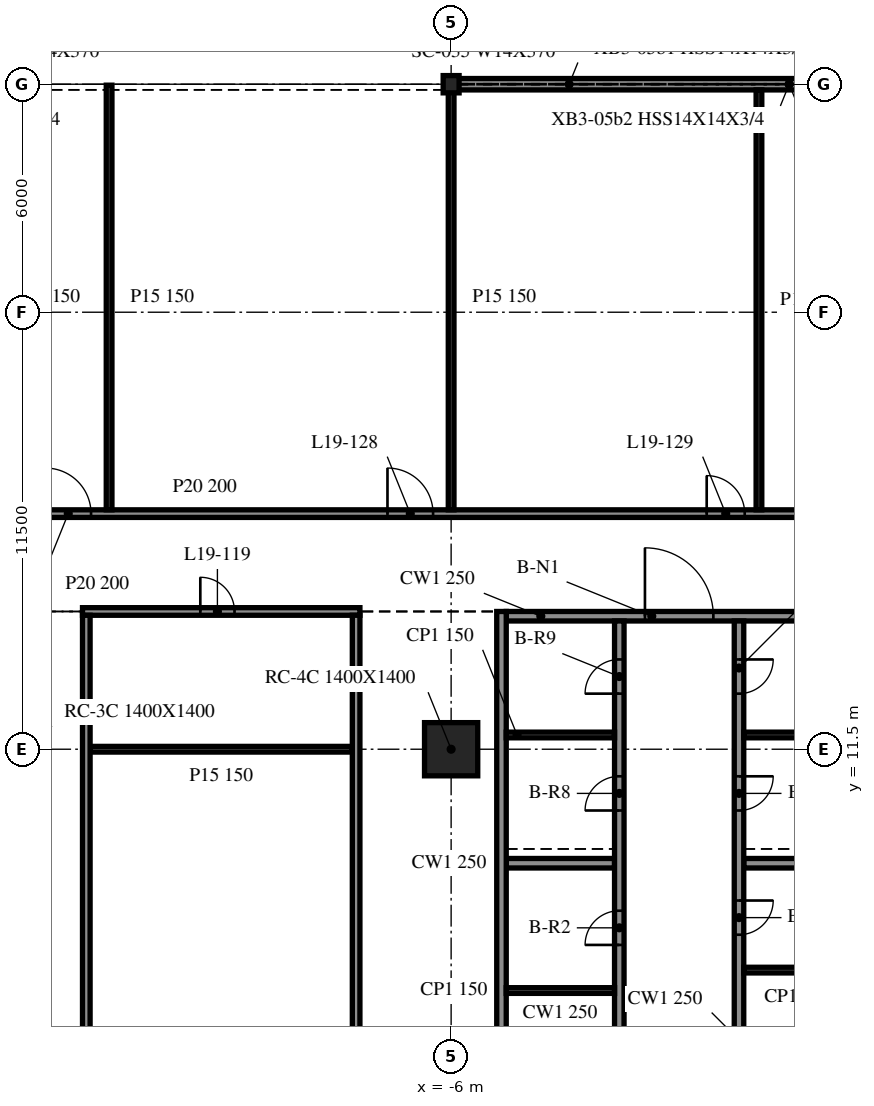
"""IFC4 building model, lengths in metres.
Left out: names, types, materials, properties, quantities, classifications, styles, units other than length and angle.
Written with IfcOpenShell. Run it as: python <this file> out.ifc"""

import sys

from ifc_helpers import new_model, si_unit, direction, frame, frame_2d, origin, origin_2d, place, context, subcontext, project, spatial, rectangle, i_section, extrude, element, fill, save


model = new_model("IFC4")
c1 = context("Model", 3, precision=1e-05, world=origin(), true_north=direction((0.0, 1.0)))
c2 = subcontext(c1, "Body", "Model", "MODEL_VIEW")
j1 = project(units=[si_unit("LENGTHUNIT", "METRE"), si_unit("PLANEANGLEUNIT", "RADIAN")], contexts=[c1])
p1 = place(None, origin())
s1 = spatial("IfcSite", under=j1, at=p1, CompositionType="ELEMENT")
p2 = place(p1, origin())
s2 = spatial("IfcBuilding", under=s1, at=p2, CompositionType="ELEMENT")
p3 = place(p2, frame((0.0, 0.0, 84.8)))
s3 = spatial("IfcBuildingStorey", under=s2, at=p3, CompositionType="ELEMENT", Elevation=84.8)
p4 = place(p3, frame((-6.0, 11.5, -0.34), z_axis=(0.0, 0.0, 1.0), x_axis=(1.0, 0.0, 0.0)))
e1 = element("IfcColumn", 1, at=p4, inside=s3, PredefinedType="COLUMN", context=c2, shape_type="SweptSolid", body=[
    extrude(rectangle(XDim=1.4, YDim=1.4, at=origin_2d()), origin(), (0.0, 0.0, 1.0), 4.1),
])
p5 = place(p3, frame((-6.0, 29.0, -0.34), z_axis=(0.0, 0.0, 1.0), x_axis=(1.0, 0.0, 0.0)))
e2 = element("IfcColumn", 2, at=p5, inside=s3, PredefinedType="COLUMN", context=c2, shape_type="SweptSolid", body=[
    extrude(i_section(OverallWidth=0.419, OverallDepth=0.455, WebThickness=0.042, FlangeThickness=0.068, at=origin_2d()), origin(), (0.0, 0.0, 1.0), 4.1),
])
p6 = place(p3, frame((5.979, 29.0, 0.0), z_axis=(0.0, 0.0, 1.0), x_axis=(-1.0, 0.0, 0.0)))
e3 = element("IfcWall", 3, at=p6, inside=s3, PredefinedType="NOTDEFINED", context=c2, shape_type="SweptSolid", body=[
    extrude(rectangle(XDim=11.958, YDim=0.3, at=frame_2d((5.979, 0.0))), origin(), (0.0, 0.0, 1.0), 3.003),
])
p7 = place(p3, frame((-4.675, 15.125, 0.0), z_axis=(0.0, 0.0, 1.0), x_axis=(0.0, -1.0, 0.0)))
e4 = element("IfcWall", 4, at=p7, inside=s3, PredefinedType="SOLIDWALL", context=c2, shape_type="SweptSolid", body=[
    extrude(rectangle(XDim=24.25, YDim=0.25, at=frame_2d((12.125, 0.0))), origin(), (0.0, 0.0, 1.0), 3.76),
])
p8 = place(p3, frame((-4.55, 15.0, 0.0), z_axis=(0.0, 0.0, 1.0), x_axis=(1.0, 0.0, 0.0)))
e5 = element("IfcWall", 5, at=p8, inside=s3, PredefinedType="SOLIDWALL", context=c2, shape_type="SweptSolid", body=[
    extrude(rectangle(XDim=9.1, YDim=0.25, at=frame_2d((4.55, 0.0))), origin(), (0.0, 0.0, 1.0), 3.76),
])
p9 = place(p8, frame((3.65, 0.0, 0.0)))
e6 = element("IfcOpeningElement", 6, at=p9, cuts=e5, PredefinedType="OPENING", context=c2, shape_type="SweptSolid", body=[
    extrude(rectangle(XDim=1.8, YDim=2.1, at=frame_2d((0.9, 1.05))), frame((0.0, 0.135, 0.0), z_axis=(0.0, -1.0, 0.0), x_axis=(1.0, 0.0, 0.0)), (0.0, 0.0, 1.0), 0.27),
])
p10 = place(p3, frame((-1.575, -8.875, 0.0), z_axis=(0.0, 0.0, 1.0), x_axis=(0.0, 1.0, 0.0)))
e7 = element("IfcWall", 7, at=p10, inside=s3, PredefinedType="SOLIDWALL", context=c2, shape_type="SweptSolid", body=[
    extrude(rectangle(XDim=23.75, YDim=0.25, at=frame_2d((11.875, 0.0))), origin(), (0.0, 0.0, 1.0), 3.76),
])
p11 = place(p10, frame((9.775, 0.0, 0.0)))
e8 = element("IfcOpeningElement", 8, at=p11, cuts=e7, PredefinedType="OPENING", context=c2, shape_type="SweptSolid", body=[
    extrude(rectangle(XDim=0.9, YDim=2.1, at=frame_2d((0.45, 1.05))), frame((0.0, 0.135, 0.0), z_axis=(0.0, -1.0, 0.0), x_axis=(1.0, 0.0, 0.0)), (0.0, 0.0, 1.0), 0.27),
])
p12 = place(p10, frame((15.225, 0.0, 0.0)))
e9 = element("IfcOpeningElement", 9, at=p12, cuts=e7, PredefinedType="OPENING", context=c2, shape_type="SweptSolid", body=[
    extrude(rectangle(XDim=0.9, YDim=2.1, at=frame_2d((0.45, 1.05))), frame((0.0, 0.135, 0.0), z_axis=(0.0, -1.0, 0.0), x_axis=(1.0, 0.0, 0.0)), (0.0, 0.0, 1.0), 0.27),
])
p13 = place(p10, frame((1.252, 0.0, 0.0)))
e10 = element("IfcOpeningElement", 10, at=p13, cuts=e7, PredefinedType="OPENING", context=c2, shape_type="SweptSolid", body=[
    extrude(rectangle(XDim=0.9, YDim=2.1, at=frame_2d((0.45, 1.05))), frame((0.0, 0.135, 0.0), z_axis=(0.0, -1.0, 0.0), x_axis=(1.0, 0.0, 0.0)), (0.0, 0.0, 1.0), 0.27),
])
p14 = place(p10, frame((4.327, 0.0, 0.0)))
e11 = element("IfcOpeningElement", 11, at=p14, cuts=e7, PredefinedType="OPENING", context=c2, shape_type="SweptSolid", body=[
    extrude(rectangle(XDim=0.9, YDim=2.1, at=frame_2d((0.45, 1.05))), frame((0.0, 0.135, 0.0), z_axis=(0.0, -1.0, 0.0), x_axis=(1.0, 0.0, 0.0)), (0.0, 0.0, 1.0), 0.27),
])
p15 = place(p10, frame((18.762, 0.0, 0.0)))
e12 = element("IfcOpeningElement", 12, at=p15, cuts=e7, PredefinedType="OPENING", context=c2, shape_type="SweptSolid", body=[
    extrude(rectangle(XDim=0.9, YDim=2.1, at=frame_2d((0.45, 1.05))), frame((0.0, 0.135, 0.0), z_axis=(0.0, -1.0, 0.0), x_axis=(1.0, 0.0, 0.0)), (0.0, 0.0, 1.0), 0.27),
])
p16 = place(p10, frame((21.837, 0.0, 0.0)))
e13 = element("IfcOpeningElement", 13, at=p16, cuts=e7, PredefinedType="OPENING", context=c2, shape_type="SweptSolid", body=[
    extrude(rectangle(XDim=0.9, YDim=2.1, at=frame_2d((0.45, 1.05))), frame((0.0, 0.135, 0.0), z_axis=(0.0, -1.0, 0.0), x_axis=(1.0, 0.0, 0.0)), (0.0, 0.0, 1.0), 0.27),
])
p17 = place(p3, frame((1.575, 14.875, 0.0), z_axis=(0.0, 0.0, 1.0), x_axis=(0.0, -1.0, 0.0)))
e14 = element("IfcWall", 14, at=p17, inside=s3, PredefinedType="SOLIDWALL", context=c2, shape_type="SweptSolid", body=[
    extrude(rectangle(XDim=17.5, YDim=0.25, at=frame_2d((8.75, 0.0))), origin(), (0.0, 0.0, 1.0), 3.76),
])
p18 = place(p17, frame((15.494, 0.0, 0.0)))
e15 = element("IfcOpeningElement", 15, at=p18, cuts=e14, PredefinedType="OPENING", context=c2, shape_type="SweptSolid", body=[
    extrude(rectangle(XDim=0.9, YDim=2.1, at=frame_2d((0.45, 1.05))), frame((0.0, 0.135, 0.0), z_axis=(0.0, -1.0, 0.0), x_axis=(1.0, 0.0, 0.0)), (0.0, 0.0, 1.0), 0.27),
])
p19 = place(p17, frame((11.425, 0.0, 0.0)))
e16 = element("IfcOpeningElement", 16, at=p19, cuts=e14, PredefinedType="OPENING", context=c2, shape_type="SweptSolid", body=[
    extrude(rectangle(XDim=0.9, YDim=2.1, at=frame_2d((0.45, 1.05))), frame((0.0, 0.135, 0.0), z_axis=(0.0, -1.0, 0.0), x_axis=(1.0, 0.0, 0.0)), (0.0, 0.0, 1.0), 0.27),
])
p20 = place(p17, frame((7.356, 0.0, 0.0)))
e17 = element("IfcOpeningElement", 17, at=p20, cuts=e14, PredefinedType="OPENING", context=c2, shape_type="SweptSolid", body=[
    extrude(rectangle(XDim=0.9, YDim=2.1, at=frame_2d((0.45, 1.05))), frame((0.0, 0.135, 0.0), z_axis=(0.0, -1.0, 0.0), x_axis=(1.0, 0.0, 0.0)), (0.0, 0.0, 1.0), 0.27),
])
p21 = place(p17, frame((4.087, 0.0, 0.0)))
e18 = element("IfcOpeningElement", 18, at=p21, cuts=e14, PredefinedType="OPENING", context=c2, shape_type="SweptSolid", body=[
    extrude(rectangle(XDim=0.9, YDim=2.1, at=frame_2d((0.45, 1.05))), frame((0.0, 0.135, 0.0), z_axis=(0.0, -1.0, 0.0), x_axis=(1.0, 0.0, 0.0)), (0.0, 0.0, 1.0), 0.27),
])
p22 = place(p17, frame((1.012, 0.0, 0.0)))
e19 = element("IfcOpeningElement", 19, at=p22, cuts=e14, PredefinedType="OPENING", context=c2, shape_type="SweptSolid", body=[
    extrude(rectangle(XDim=0.9, YDim=2.1, at=frame_2d((0.45, 1.05))), frame((0.0, 0.135, 0.0), z_axis=(0.0, -1.0, 0.0), x_axis=(1.0, 0.0, 0.0)), (0.0, 0.0, 1.0), 0.27),
])
for number, where, z_axis, x_axis in (
    (20, (-4.55, 8.5, 0.0), (0.0, 0.0, 1.0), (1.0, 0.0, 0.0)),
    (21, (1.7, 8.5, 0.0), (0.0, 0.0, 1.0), (1.0, 0.0, 0.0)),
):
    element("IfcWall", number, at=place(p3, frame(where, z_axis=z_axis, x_axis=x_axis)), inside=s3, PredefinedType="SOLIDWALL", context=c2, shape_type="SweptSolid", body=[
        extrude(rectangle(XDim=2.85, YDim=0.25, at=frame_2d((1.425, 0.0))), origin(), (0.0, 0.0, 1.0), 3.76),
    ])
for number, where, z_axis, x_axis in (
    (22, (-4.55, 5.15, 0.0), (0.0, 0.0, 1.0), (1.0, 0.0, 0.0)),
    (23, (1.7, 5.688, 0.0), (0.0, 0.0, 1.0), (1.0, 0.0, 0.0)),
    (24, (-4.55, 11.875, 0.0), (0.0, 0.0, 1.0), (1.0, 0.0, 0.0)),
    (25, (1.7, 11.875, 0.0), (0.0, 0.0, 1.0), (1.0, 0.0, 0.0)),
):
    element("IfcWall", number, at=place(p3, frame(where, z_axis=z_axis, x_axis=x_axis)), inside=s3, PredefinedType="PARTITIONING", context=c2, shape_type="SweptSolid", body=[
        extrude(rectangle(XDim=2.85, YDim=0.15, at=frame_2d((1.425, 0.0))), origin(), (0.0, 0.0, 1.0), 3.76),
    ])
p23 = place(p3, frame((-15.5, 11.5, 0.0), z_axis=(0.0, 0.0, 1.0), x_axis=(1.0, 0.0, 0.0)))
e26 = element("IfcWall", 26, at=p23, inside=s3, PredefinedType="PARTITIONING", context=c2, shape_type="SweptSolid", body=[
    extrude(rectangle(XDim=6.9, YDim=0.15, at=frame_2d((3.45, 0.0))), origin(), (0.0, 0.0, 1.0), 3.76),
])
p24 = place(p3, frame((-15.7, 15.125, 0.0), z_axis=(0.0, 0.0, 1.0), x_axis=(1.0, 0.0, 0.0)))
e27 = element("IfcWall", 27, at=p24, inside=s3, PredefinedType="PARTITIONING", context=c2, shape_type="SweptSolid", body=[
    extrude(rectangle(XDim=7.3, YDim=0.2, at=frame_2d((3.65, 0.0))), origin(), (0.0, 0.0, 1.0), 3.76),
])
p25 = place(p24, frame((3.1, 0.0, 0.0)))
e28 = element("IfcOpeningElement", 28, at=p25, cuts=e27, PredefinedType="OPENING", context=c2, shape_type="SweptSolid", body=[
    extrude(rectangle(XDim=0.9, YDim=2.1, at=frame_2d((0.45, 1.05))), frame((0.0, 0.11, 0.0), z_axis=(0.0, -1.0, 0.0), x_axis=(1.0, 0.0, 0.0)), (0.0, 0.0, 1.0), 0.22),
])
p26 = place(p3, frame((-41.975, 17.7, 0.0), z_axis=(0.0, 0.0, 1.0), x_axis=(1.0, 0.0, 0.0)))
e29 = element("IfcWall", 29, at=p26, inside=s3, PredefinedType="PARTITIONING", context=c2, shape_type="SweptSolid", body=[
    extrude(rectangle(XDim=95.95, YDim=0.2, at=frame_2d((47.975, 0.0))), origin(), (0.0, 0.0, 1.0), 3.76),
])
p27 = place(p26, frame((4.5, 0.0, 0.0)))
e30 = element("IfcOpeningElement", 30, at=p27, cuts=e29, PredefinedType="OPENING", context=c2, shape_type="SweptSolid", body=[
    extrude(rectangle(XDim=1.0, YDim=2.1, at=frame_2d((0.5, 1.05))), frame((0.0, 0.11, 0.0), z_axis=(0.0, -1.0, 0.0), x_axis=(1.0, 0.0, 0.0)), (0.0, 0.0, 1.0), 0.22),
])
p28 = place(p26, frame((13.3, 0.0, 0.0)))
e31 = element("IfcOpeningElement", 31, at=p28, cuts=e29, PredefinedType="OPENING", context=c2, shape_type="SweptSolid", body=[
    extrude(rectangle(XDim=1.2, YDim=2.1, at=frame_2d((0.6, 1.05))), frame((0.0, 0.11, 0.0), z_axis=(0.0, -1.0, 0.0), x_axis=(1.0, 0.0, 0.0)), (0.0, 0.0, 1.0), 0.22),
])
p29 = place(p26, frame((16.3, 0.0, 0.0)))
e32 = element("IfcOpeningElement", 32, at=p29, cuts=e29, PredefinedType="OPENING", context=c2, shape_type="SweptSolid", body=[
    extrude(rectangle(XDim=1.2, YDim=2.1, at=frame_2d((0.6, 1.05))), frame((0.0, 0.11, 0.0), z_axis=(0.0, -1.0, 0.0), x_axis=(1.0, 0.0, 0.0)), (0.0, 0.0, 1.0), 0.22),
])
p30 = place(p26, frame((22.5, 0.0, 0.0)))
e33 = element("IfcOpeningElement", 33, at=p30, cuts=e29, PredefinedType="OPENING", context=c2, shape_type="SweptSolid", body=[
    extrude(rectangle(XDim=1.0, YDim=2.1, at=frame_2d((0.5, 1.05))), frame((0.0, 0.11, 0.0), z_axis=(0.0, -1.0, 0.0), x_axis=(1.0, 0.0, 0.0)), (0.0, 0.0, 1.0), 0.22),
])
p31 = place(p26, frame((25.3, 0.0, 0.0)))
e34 = element("IfcOpeningElement", 34, at=p31, cuts=e29, PredefinedType="OPENING", context=c2, shape_type="SweptSolid", body=[
    extrude(rectangle(XDim=1.2, YDim=2.1, at=frame_2d((0.6, 1.05))), frame((0.0, 0.11, 0.0), z_axis=(0.0, -1.0, 0.0), x_axis=(1.0, 0.0, 0.0)), (0.0, 0.0, 1.0), 0.22),
])
p32 = place(p26, frame((34.3, 0.0, 0.0)))
e35 = element("IfcOpeningElement", 35, at=p32, cuts=e29, PredefinedType="OPENING", context=c2, shape_type="SweptSolid", body=[
    extrude(rectangle(XDim=1.2, YDim=2.1, at=frame_2d((0.6, 1.05))), frame((0.0, 0.11, 0.0), z_axis=(0.0, -1.0, 0.0), x_axis=(1.0, 0.0, 0.0)), (0.0, 0.0, 1.0), 0.22),
])
p33 = place(p26, frame((42.7, 0.0, 0.0)))
e36 = element("IfcOpeningElement", 36, at=p33, cuts=e29, PredefinedType="OPENING", context=c2, shape_type="SweptSolid", body=[
    extrude(rectangle(XDim=1.0, YDim=2.1, at=frame_2d((0.5, 1.05))), frame((0.0, 0.11, 0.0), z_axis=(0.0, -1.0, 0.0), x_axis=(1.0, 0.0, 0.0)), (0.0, 0.0, 1.0), 0.22),
])
p34 = place(p26, frame((47.3, 0.0, 0.0)))
e37 = element("IfcOpeningElement", 37, at=p34, cuts=e29, PredefinedType="OPENING", context=c2, shape_type="SweptSolid", body=[
    extrude(rectangle(XDim=1.2, YDim=2.1, at=frame_2d((0.6, 1.05))), frame((0.0, 0.11, 0.0), z_axis=(0.0, -1.0, 0.0), x_axis=(1.0, 0.0, 0.0)), (0.0, 0.0, 1.0), 0.22),
])
p35 = place(p26, frame((51.1, 0.0, 0.0)))
e38 = element("IfcOpeningElement", 38, at=p35, cuts=e29, PredefinedType="OPENING", context=c2, shape_type="SweptSolid", body=[
    extrude(rectangle(XDim=1.2, YDim=2.1, at=frame_2d((0.6, 1.05))), frame((0.0, 0.11, 0.0), z_axis=(0.0, -1.0, 0.0), x_axis=(1.0, 0.0, 0.0)), (0.0, 0.0, 1.0), 0.22),
])
p36 = place(p26, frame((54.1, 0.0, 0.0)))
e39 = element("IfcOpeningElement", 39, at=p36, cuts=e29, PredefinedType="OPENING", context=c2, shape_type="SweptSolid", body=[
    extrude(rectangle(XDim=1.0, YDim=2.1, at=frame_2d((0.5, 1.05))), frame((0.0, 0.11, 0.0), z_axis=(0.0, -1.0, 0.0), x_axis=(1.0, 0.0, 0.0)), (0.0, 0.0, 1.0), 0.22),
])
p37 = place(p26, frame((60.1, 0.0, 0.0)))
e40 = element("IfcOpeningElement", 40, at=p37, cuts=e29, PredefinedType="OPENING", context=c2, shape_type="SweptSolid", body=[
    extrude(rectangle(XDim=1.2, YDim=2.1, at=frame_2d((0.6, 1.05))), frame((0.0, 0.11, 0.0), z_axis=(0.0, -1.0, 0.0), x_axis=(1.0, 0.0, 0.0)), (0.0, 0.0, 1.0), 0.22),
])
p38 = place(p26, frame((63.1, 0.0, 0.0)))
e41 = element("IfcOpeningElement", 41, at=p38, cuts=e29, PredefinedType="OPENING", context=c2, shape_type="SweptSolid", body=[
    extrude(rectangle(XDim=1.2, YDim=2.1, at=frame_2d((0.6, 1.05))), frame((0.0, 0.11, 0.0), z_axis=(0.0, -1.0, 0.0), x_axis=(1.0, 0.0, 0.0)), (0.0, 0.0, 1.0), 0.22),
])
p39 = place(p26, frame((72.1, 0.0, 0.0)))
e42 = element("IfcOpeningElement", 42, at=p39, cuts=e29, PredefinedType="OPENING", context=c2, shape_type="SweptSolid", body=[
    extrude(rectangle(XDim=1.0, YDim=2.1, at=frame_2d((0.5, 1.05))), frame((0.0, 0.11, 0.0), z_axis=(0.0, -1.0, 0.0), x_axis=(1.0, 0.0, 0.0)), (0.0, 0.0, 1.0), 0.22),
])
p40 = place(p26, frame((78.1, 0.0, 0.0)))
e43 = element("IfcOpeningElement", 43, at=p40, cuts=e29, PredefinedType="OPENING", context=c2, shape_type="SweptSolid", body=[
    extrude(rectangle(XDim=1.2, YDim=2.1, at=frame_2d((0.6, 1.05))), frame((0.0, 0.11, 0.0), z_axis=(0.0, -1.0, 0.0), x_axis=(1.0, 0.0, 0.0)), (0.0, 0.0, 1.0), 0.22),
])
p41 = place(p26, frame((87.1, 0.0, 0.0)))
e44 = element("IfcOpeningElement", 44, at=p41, cuts=e29, PredefinedType="OPENING", context=c2, shape_type="SweptSolid", body=[
    extrude(rectangle(XDim=1.2, YDim=2.1, at=frame_2d((0.6, 1.05))), frame((0.0, 0.11, 0.0), z_axis=(0.0, -1.0, 0.0), x_axis=(1.0, 0.0, 0.0)), (0.0, 0.0, 1.0), 0.22),
])
p42 = place(p26, frame((90.1, 0.0, 0.0)))
e45 = element("IfcOpeningElement", 45, at=p42, cuts=e29, PredefinedType="OPENING", context=c2, shape_type="SweptSolid", body=[
    extrude(rectangle(XDim=1.0, YDim=2.1, at=frame_2d((0.5, 1.05))), frame((0.0, 0.11, 0.0), z_axis=(0.0, -1.0, 0.0), x_axis=(1.0, 0.0, 0.0)), (0.0, 0.0, 1.0), 0.22),
])
p43 = place(p3, frame((-15.6, -9.025, 0.0), z_axis=(0.0, 0.0, 1.0), x_axis=(0.0, 1.0, 0.0)))
e46 = element("IfcWall", 46, at=p43, inside=s3, PredefinedType="PARTITIONING", context=c2, shape_type="SweptSolid", body=[
    extrude(rectangle(XDim=24.05, YDim=0.2, at=frame_2d((12.025, 0.0))), origin(), (0.0, 0.0, 1.0), 3.76),
])
p44 = place(p43, frame((11.5, 0.0, 0.0)))
e47 = element("IfcOpeningElement", 47, at=p44, cuts=e46, PredefinedType="OPENING", context=c2, shape_type="SweptSolid", body=[
    extrude(rectangle(XDim=0.9, YDim=2.1, at=frame_2d((0.45, 1.05))), frame((0.0, 0.11, 0.0), z_axis=(0.0, -1.0, 0.0), x_axis=(1.0, 0.0, 0.0)), (0.0, 0.0, 1.0), 0.22),
])
p45 = place(p3, frame((-15.0, 17.8, 0.0), z_axis=(0.0, 0.0, 1.0), x_axis=(0.0, 1.0, 0.0)))
e48 = element("IfcWall", 48, at=p45, inside=s3, PredefinedType="PARTITIONING", context=c2, shape_type="SweptSolid", body=[
    extrude(rectangle(XDim=11.175, YDim=0.15, at=frame_2d((5.587, 0.0))), origin(), (0.0, 0.0, 1.0), 3.76),
])
p46 = place(p3, frame((-8.5, -9.025, 0.0), z_axis=(0.0, 0.0, 1.0), x_axis=(0.0, 1.0, 0.0)))
e49 = element("IfcWall", 49, at=p46, inside=s3, PredefinedType="PARTITIONING", context=c2, shape_type="SweptSolid", body=[
    extrude(rectangle(XDim=24.05, YDim=0.2, at=frame_2d((12.025, 0.0))), origin(), (0.0, 0.0, 1.0), 3.76),
])
p47 = place(p3, frame((-6.0, 17.8, 0.0), z_axis=(0.0, 0.0, 1.0), x_axis=(0.0, 1.0, 0.0)))
e50 = element("IfcWall", 50, at=p47, inside=s3, PredefinedType="PARTITIONING", context=c2, shape_type="SweptSolid", body=[
    extrude(rectangle(XDim=11.175, YDim=0.15, at=frame_2d((5.587, 0.0))), origin(), (0.0, 0.0, 1.0), 3.76),
])
p48 = place(p3, frame((2.1, 17.8, 0.0), z_axis=(0.0, 0.0, 1.0), x_axis=(0.0, 1.0, 0.0)))
e51 = element("IfcWall", 51, at=p48, inside=s3, PredefinedType="PARTITIONING", context=c2, shape_type="SweptSolid", body=[
    extrude(rectangle(XDim=11.05, YDim=0.15, at=frame_2d((5.525, 0.0))), origin(), (0.0, 0.0, 1.0), 3.76),
])
p49 = place(p9, origin())
e52 = element("IfcDoor", 52, at=p49, inside=s3, OperationType="DOUBLE_DOOR_SINGLE_SWING", PredefinedType="DOOR", context=c2, shape_type="SweptSolid", body=[
    extrude(rectangle(XDim=1.8, YDim=2.1, at=frame_2d((0.9, 1.05))), frame((0.0, 0.025, 0.0), z_axis=(0.0, -1.0, 0.0), x_axis=(1.0, 0.0, 0.0)), (0.0, 0.0, 1.0), 0.05),
])
fill(e6, e52)
p50 = place(p12, origin())
e53 = element("IfcDoor", 53, at=p50, inside=s3, OperationType="SINGLE_SWING_RIGHT", PredefinedType="DOOR", context=c2, shape_type="SweptSolid", body=[
    extrude(rectangle(XDim=0.9, YDim=2.1, at=frame_2d((0.45, 1.05))), frame((0.0, 0.025, 0.0), z_axis=(0.0, -1.0, 0.0), x_axis=(1.0, 0.0, 0.0)), (0.0, 0.0, 1.0), 0.05),
])
fill(e9, e53)
p51 = place(p20, origin())
e54 = element("IfcDoor", 54, at=p51, inside=s3, OperationType="SINGLE_SWING_LEFT", PredefinedType="DOOR", context=c2, shape_type="SweptSolid", body=[
    extrude(rectangle(XDim=0.9, YDim=2.1, at=frame_2d((0.45, 1.05))), frame((0.0, 0.025, 0.0), z_axis=(0.0, -1.0, 0.0), x_axis=(1.0, 0.0, 0.0)), (0.0, 0.0, 1.0), 0.05),
])
fill(e17, e54)
p52 = place(p15, origin())
e55 = element("IfcDoor", 55, at=p52, inside=s3, OperationType="SINGLE_SWING_RIGHT", PredefinedType="DOOR", context=c2, shape_type="SweptSolid", body=[
    extrude(rectangle(XDim=0.9, YDim=2.1, at=frame_2d((0.45, 1.05))), frame((0.0, 0.025, 0.0), z_axis=(0.0, -1.0, 0.0), x_axis=(1.0, 0.0, 0.0)), (0.0, 0.0, 1.0), 0.05),
])
fill(e12, e55)
p53 = place(p16, origin())
e56 = element("IfcDoor", 56, at=p53, inside=s3, OperationType="SINGLE_SWING_LEFT", PredefinedType="DOOR", context=c2, shape_type="SweptSolid", body=[
    extrude(rectangle(XDim=0.9, YDim=2.1, at=frame_2d((0.45, 1.05))), frame((0.0, 0.025, 0.0), z_axis=(0.0, -1.0, 0.0), x_axis=(1.0, 0.0, 0.0)), (0.0, 0.0, 1.0), 0.05),
])
fill(e13, e56)
p54 = place(p21, origin())
e57 = element("IfcDoor", 57, at=p54, inside=s3, OperationType="SINGLE_SWING_RIGHT", PredefinedType="DOOR", context=c2, shape_type="SweptSolid", body=[
    extrude(rectangle(XDim=0.9, YDim=2.1, at=frame_2d((0.45, 1.05))), frame((0.0, 0.025, 0.0), z_axis=(0.0, -1.0, 0.0), x_axis=(1.0, 0.0, 0.0)), (0.0, 0.0, 1.0), 0.05),
])
fill(e18, e57)
p55 = place(p22, origin())
e58 = element("IfcDoor", 58, at=p55, inside=s3, OperationType="SINGLE_SWING_LEFT", PredefinedType="DOOR", context=c2, shape_type="SweptSolid", body=[
    extrude(rectangle(XDim=0.9, YDim=2.1, at=frame_2d((0.45, 1.05))), frame((0.0, 0.025, 0.0), z_axis=(0.0, -1.0, 0.0), x_axis=(1.0, 0.0, 0.0)), (0.0, 0.0, 1.0), 0.05),
])
fill(e19, e58)
p56 = place(p25, origin())
e59 = element("IfcDoor", 59, at=p56, inside=s3, OperationType="SINGLE_SWING_RIGHT", PredefinedType="DOOR", context=c2, shape_type="SweptSolid", body=[
    extrude(rectangle(XDim=0.9, YDim=2.1, at=frame_2d((0.45, 1.05))), frame((0.0, 0.025, 0.0), z_axis=(0.0, -1.0, 0.0), x_axis=(1.0, 0.0, 0.0)), (0.0, 0.0, 1.0), 0.05),
])
fill(e28, e59)
p57 = place(p31, origin())
e60 = element("IfcDoor", 60, at=p57, inside=s3, OperationType="SINGLE_SWING_LEFT", PredefinedType="DOOR", context=c2, shape_type="SweptSolid", body=[
    extrude(rectangle(XDim=1.2, YDim=2.1, at=frame_2d((0.6, 1.05))), frame((0.0, 0.025, 0.0), z_axis=(0.0, -1.0, 0.0), x_axis=(1.0, 0.0, 0.0)), (0.0, 0.0, 1.0), 0.05),
])
fill(e34, e60)
p58 = place(p32, origin())
e61 = element("IfcDoor", 61, at=p58, inside=s3, OperationType="SINGLE_SWING_LEFT", PredefinedType="DOOR", context=c2, shape_type="SweptSolid", body=[
    extrude(rectangle(XDim=1.2, YDim=2.1, at=frame_2d((0.6, 1.05))), frame((0.0, 0.025, 0.0), z_axis=(0.0, -1.0, 0.0), x_axis=(1.0, 0.0, 0.0)), (0.0, 0.0, 1.0), 0.05),
])
fill(e35, e61)
p59 = place(p33, origin())
e62 = element("IfcDoor", 62, at=p59, inside=s3, OperationType="SINGLE_SWING_LEFT", PredefinedType="DOOR", context=c2, shape_type="SweptSolid", body=[
    extrude(rectangle(XDim=1.0, YDim=2.1, at=frame_2d((0.5, 1.05))), frame((0.0, 0.025, 0.0), z_axis=(0.0, -1.0, 0.0), x_axis=(1.0, 0.0, 0.0)), (0.0, 0.0, 1.0), 0.05),
])
fill(e36, e62)
save(model, sys.argv[1])
